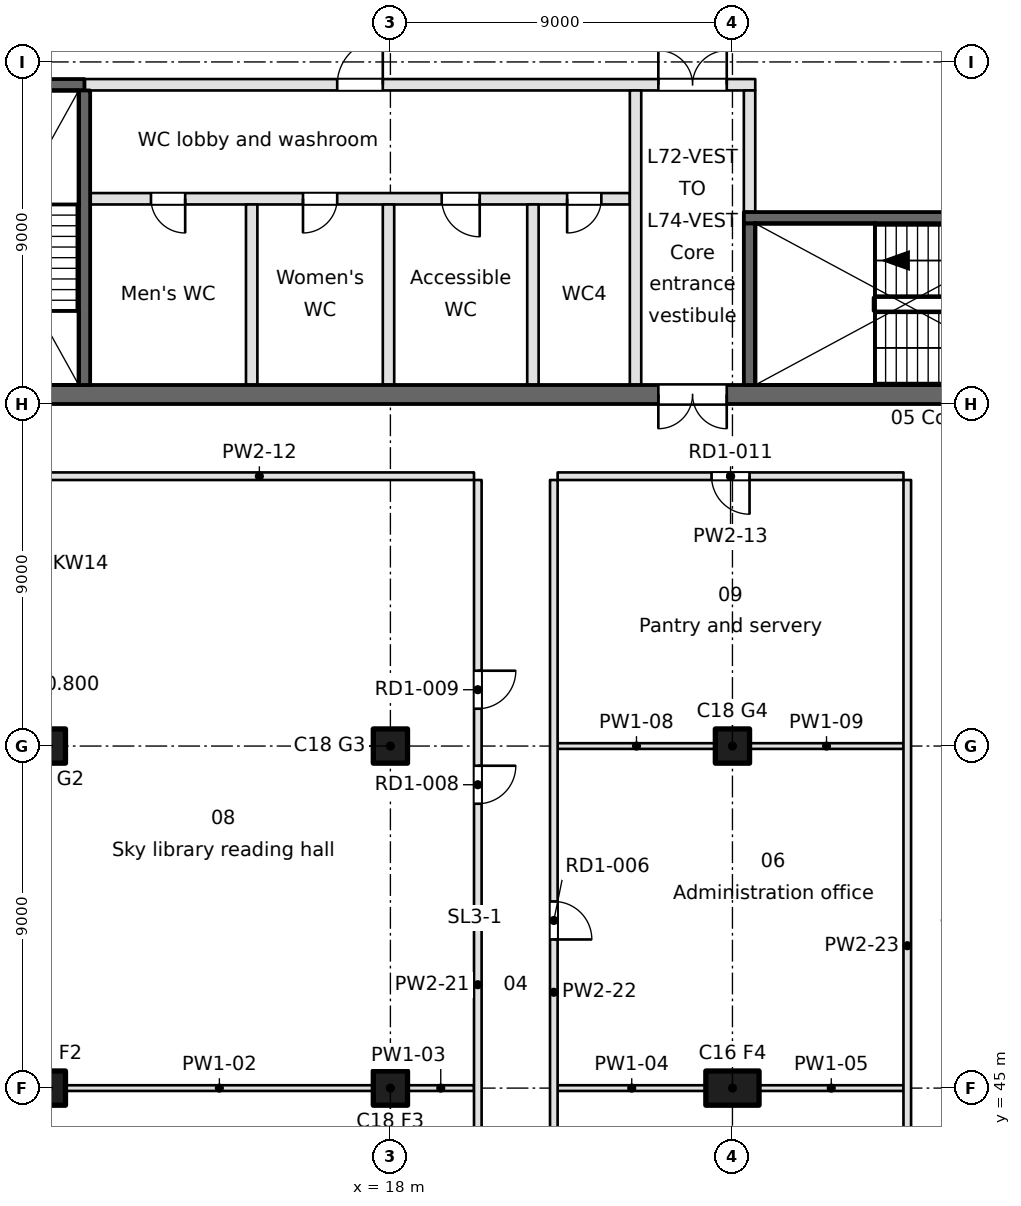
"""IFC4 building model, lengths in metres.
Left out: names, types, materials, properties, quantities, classifications, styles, units other than length and angle.
Written with IfcOpenShell. Run it as: python <this file> out.ifc"""

import sys

from ifc_helpers import new_model, si_unit, direction, frame, frame_2d, origin, origin_2d, place, context, subcontext, project, spatial, rectangle, extrude, element, fill, save


model = new_model("IFC4")
c1 = context("Model", 3, precision=1e-05, world=origin(), true_north=direction((0.0, 1.0)))
c2 = subcontext(c1, "Body", "Model", "MODEL_VIEW")
j1 = project(units=[si_unit("LENGTHUNIT", "METRE"), si_unit("PLANEANGLEUNIT", "RADIAN")], contexts=[c1])
p1 = place(None, origin())
s1 = spatial("IfcSite", under=j1, at=p1, CompositionType="ELEMENT")
p2 = place(p1, origin())
s2 = spatial("IfcBuilding", under=s1, at=p2, CompositionType="ELEMENT")
p3 = place(p2, frame((0.0, 0.0, 280.8)))
s3 = spatial("IfcBuildingStorey", under=s2, at=p3, CompositionType="ELEMENT", Elevation=280.8)
for number, where, z_axis, x_axis in (
    (1, (9.0, 45.0, 0.0), (0.0, 0.0, 1.0), (1.0, 0.0, 0.0)),
    (2, (9.0, 54.0, 0.0), (0.0, 0.0, 1.0), (1.0, 0.0, 0.0)),
    (3, (18.0, 45.0, 0.0), (0.0, 0.0, 1.0), (1.0, 0.0, 0.0)),
    (4, (18.0, 54.0, 0.0), (0.0, 0.0, 1.0), (1.0, 0.0, 0.0)),
):
    element("IfcColumn", number, at=place(p3, frame(where, z_axis=z_axis, x_axis=x_axis)), inside=s3, PredefinedType="COLUMN", context=c2, shape_type="SweptSolid", body=[
        extrude(rectangle(XDim=0.9, YDim=0.9, at=origin_2d()), origin(), (0.0, 0.0, 1.0), 3.7),
    ])
p4 = place(p3, frame((27.0, 45.0, 0.0), z_axis=(0.0, 0.0, 1.0), x_axis=(1.0, 0.0, 0.0)))
e5 = element("IfcColumn", 5, at=p4, inside=s3, PredefinedType="COLUMN", context=c2, shape_type="SweptSolid", body=[
    extrude(rectangle(XDim=1.4, YDim=0.9, at=origin_2d()), origin(), (0.0, 0.0, 1.0), 3.7),
])
p5 = place(p3, frame((27.0, 54.0, 0.0), z_axis=(0.0, 0.0, 1.0), x_axis=(1.0, 0.0, 0.0)))
e6 = element("IfcColumn", 6, at=p5, inside=s3, PredefinedType="COLUMN", context=c2, shape_type="SweptSolid", body=[
    extrude(rectangle(XDim=0.9, YDim=0.9, at=origin_2d()), origin(), (0.0, 0.0, 1.0), 3.7),
])
p6 = place(p3, frame((0.9, 63.25, -0.4), z_axis=(0.0, 0.0, 1.0), x_axis=(1.0, 0.0, 0.0)))
e7 = element("IfcWall", 7, at=p6, inside=s3, PredefinedType="SOLIDWALL", context=c2, shape_type="SweptSolid", body=[
    extrude(rectangle(XDim=35.1, YDim=0.5, at=frame_2d((17.55, 0.0))), origin(), (0.0, 0.0, 1.0), 3.7),
])
p7 = place(p6, frame((24.15, 0.0, 0.4)))
e8 = element("IfcOpeningElement", 8, at=p7, cuts=e7, PredefinedType="OPENING", context=c2, shape_type="SweptSolid", body=[
    extrude(rectangle(XDim=1.8, YDim=2.1, at=frame_2d((0.9, 1.05))), frame((0.0, 0.25, 0.0), z_axis=(0.0, -1.0, 0.0), x_axis=(1.0, 0.0, 0.0)), (0.0, 0.0, 1.0), 0.5),
])
p8 = place(p6, frame((1.55, 0.0, 0.4)))
e9 = element("IfcOpeningElement", 9, at=p8, cuts=e7, PredefinedType="OPENING", context=c2, shape_type="SweptSolid", body=[
    extrude(rectangle(XDim=1.2, YDim=2.1, at=frame_2d((0.6, 1.05))), frame((0.0, 0.25, 0.0), z_axis=(0.0, -1.0, 0.0), x_axis=(1.0, 0.0, 0.0)), (0.0, 0.0, 1.0), 0.5),
])
p9 = place(p6, frame((6.15, 0.0, 0.4)))
e10 = element("IfcOpeningElement", 10, at=p9, cuts=e7, PredefinedType="OPENING", context=c2, shape_type="SweptSolid", body=[
    extrude(rectangle(XDim=1.2, YDim=2.1, at=frame_2d((0.6, 1.05))), frame((0.0, 0.25, 0.0), z_axis=(0.0, -1.0, 0.0), x_axis=(1.0, 0.0, 0.0)), (0.0, 0.0, 1.0), 0.5),
])
p10 = place(p3, frame((27.3, 67.9, -0.4), z_axis=(0.0, 0.0, 1.0), x_axis=(1.0, 0.0, 0.0)))
e11 = element("IfcWall", 11, at=p10, inside=s3, PredefinedType="SOLIDWALL", context=c2, shape_type="SweptSolid", body=[
    extrude(rectangle(XDim=8.2, YDim=0.3, at=frame_2d((4.1, 0.0))), origin(), (0.0, 0.0, 1.0), 3.7),
])
p11 = place(p3, frame((10.1, 68.4, 0.0), z_axis=(0.0, 0.0, 1.0), x_axis=(1.0, 0.0, 0.0)))
e12 = element("IfcWall", 12, at=p11, inside=s3, PredefinedType="PARTITIONING", context=c2, shape_type="SweptSolid", body=[
    extrude(rectangle(XDim=14.2, YDim=0.3, at=frame_2d((7.1, 0.0))), origin(), (0.0, 0.0, 1.0), 3.3),
])
p12 = place(p11, frame((1.6, 0.0, 0.0)))
e13 = element("IfcOpeningElement", 13, at=p12, cuts=e12, PredefinedType="OPENING", context=c2, shape_type="SweptSolid", body=[
    extrude(rectangle(XDim=0.9, YDim=2.1, at=frame_2d((0.45, 1.05))), frame((0.0, 0.15, 0.0), z_axis=(0.0, -1.0, 0.0), x_axis=(1.0, 0.0, 0.0)), (0.0, 0.0, 1.0), 0.3),
])
p13 = place(p11, frame((5.6, 0.0, 0.0)))
e14 = element("IfcOpeningElement", 14, at=p13, cuts=e12, PredefinedType="OPENING", context=c2, shape_type="SweptSolid", body=[
    extrude(rectangle(XDim=0.9, YDim=2.1, at=frame_2d((0.45, 1.05))), frame((0.0, 0.15, 0.0), z_axis=(0.0, -1.0, 0.0), x_axis=(1.0, 0.0, 0.0)), (0.0, 0.0, 1.0), 0.3),
])
p14 = place(p11, frame((9.25, 0.0, 0.0)))
e15 = element("IfcOpeningElement", 15, at=p14, cuts=e12, PredefinedType="OPENING", context=c2, shape_type="SweptSolid", body=[
    extrude(rectangle(XDim=1.0, YDim=2.1, at=frame_2d((0.5, 1.05))), frame((0.0, 0.15, 0.0), z_axis=(0.0, -1.0, 0.0), x_axis=(1.0, 0.0, 0.0)), (0.0, 0.0, 1.0), 0.3),
])
p15 = place(p11, frame((12.55, 0.0, 0.0)))
e16 = element("IfcOpeningElement", 16, at=p15, cuts=e12, PredefinedType="OPENING", context=c2, shape_type="SweptSolid", body=[
    extrude(rectangle(XDim=0.9, YDim=2.1, at=frame_2d((0.45, 1.05))), frame((0.0, 0.15, 0.0), z_axis=(0.0, -1.0, 0.0), x_axis=(1.0, 0.0, 0.0)), (0.0, 0.0, 1.0), 0.3),
])
p16 = place(p3, frame((0.9, 71.4, -0.4), z_axis=(0.0, 0.0, 1.0), x_axis=(1.0, 0.0, 0.0)))
e17 = element("IfcWall", 17, at=p16, inside=s3, PredefinedType="SOLIDWALL", context=c2, shape_type="SweptSolid", body=[
    extrude(rectangle(XDim=9.05, YDim=0.3, at=frame_2d((4.525, 0.0))), origin(), (0.0, 0.0, 1.0), 3.7),
])
p17 = place(p3, frame((9.95, 71.4, 0.0), z_axis=(0.0, 0.0, 1.0), x_axis=(1.0, 0.0, 0.0)))
e18 = element("IfcWall", 18, at=p17, inside=s3, PredefinedType="PARTITIONING", context=c2, shape_type="SweptSolid", body=[
    extrude(rectangle(XDim=17.65, YDim=0.3, at=frame_2d((8.825, 0.0))), origin(), (0.0, 0.0, 1.0), 3.3),
])
p18 = place(p17, frame((15.1, 0.0, 0.0)))
e19 = element("IfcOpeningElement", 19, at=p18, cuts=e18, PredefinedType="OPENING", context=c2, shape_type="SweptSolid", body=[
    extrude(rectangle(XDim=1.8, YDim=2.1, at=frame_2d((0.9, 1.05))), frame((0.0, 0.15, 0.0), z_axis=(0.0, -1.0, 0.0), x_axis=(1.0, 0.0, 0.0)), (0.0, 0.0, 1.0), 0.3),
])
p19 = place(p17, frame((6.65, 0.0, 0.0)))
e20 = element("IfcOpeningElement", 20, at=p19, cuts=e18, PredefinedType="OPENING", context=c2, shape_type="SweptSolid", body=[
    extrude(rectangle(XDim=1.2, YDim=2.1, at=frame_2d((0.6, 1.05))), frame((0.0, 0.15, 0.0), z_axis=(0.0, -1.0, 0.0), x_axis=(1.0, 0.0, 0.0)), (0.0, 0.0, 1.0), 0.3),
])
p20 = place(p3, frame((9.95, 63.5, -0.4), z_axis=(0.0, 0.0, 1.0), x_axis=(0.0, 1.0, 0.0)))
e21 = element("IfcWall", 21, at=p20, inside=s3, PredefinedType="SOLIDWALL", context=c2, shape_type="SweptSolid", body=[
    extrude(rectangle(XDim=7.75, YDim=0.3, at=frame_2d((3.875, 0.0))), origin(), (0.0, 0.0, 1.0), 3.7),
])
for number, where, z_axis, x_axis in (
    (22, (14.35, 63.5, 0.0), (0.0, 0.0, 1.0), (0.0, 1.0, 0.0)),
    (23, (17.95, 63.5, 0.0), (0.0, 0.0, 1.0), (0.0, 1.0, 0.0)),
    (24, (21.75, 63.5, 0.0), (0.0, 0.0, 1.0), (0.0, 1.0, 0.0)),
):
    element("IfcWall", number, at=place(p3, frame(where, z_axis=z_axis, x_axis=x_axis)), inside=s3, PredefinedType="PARTITIONING", context=c2, shape_type="SweptSolid", body=[
        extrude(rectangle(XDim=4.75, YDim=0.3, at=frame_2d((2.375, 0.0))), origin(), (0.0, 0.0, 1.0), 3.3),
    ])
p21 = place(p3, frame((24.45, 63.5, 0.0), z_axis=(0.0, 0.0, 1.0), x_axis=(0.0, 1.0, 0.0)))
e25 = element("IfcWall", 25, at=p21, inside=s3, PredefinedType="PARTITIONING", context=c2, shape_type="SweptSolid", body=[
    extrude(rectangle(XDim=7.75, YDim=0.3, at=frame_2d((3.875, 0.0))), origin(), (0.0, 0.0, 1.0), 3.3),
])
p22 = place(p3, frame((27.45, 63.5, -0.4), z_axis=(0.0, 0.0, 1.0), x_axis=(0.0, 1.0, 0.0)))
e26 = element("IfcWall", 26, at=p22, inside=s3, PredefinedType="SOLIDWALL", context=c2, shape_type="SweptSolid", body=[
    extrude(rectangle(XDim=4.25, YDim=0.3, at=frame_2d((2.125, 0.0))), origin(), (0.0, 0.0, 1.0), 3.7),
])
p23 = place(p3, frame((27.45, 68.05, 0.0), z_axis=(0.0, 0.0, 1.0), x_axis=(0.0, 1.0, 0.0)))
e27 = element("IfcWall", 27, at=p23, inside=s3, PredefinedType="PARTITIONING", context=c2, shape_type="SweptSolid", body=[
    extrude(rectangle(XDim=3.2, YDim=0.3, at=frame_2d((1.6, 0.0))), origin(), (0.0, 0.0, 1.0), 3.3),
])
p24 = place(p3, frame((9.45, 45.0, 0.0), z_axis=(0.0, 0.0, 1.0), x_axis=(1.0, 0.0, 0.0)))
e28 = element("IfcWall", 28, at=p24, inside=s3, PredefinedType="PARTITIONING", context=c2, shape_type="SweptSolid", body=[
    extrude(rectangle(XDim=8.1, YDim=0.15, at=frame_2d((4.05, 0.0))), origin(), (0.0, 0.0, 1.0), 3.3),
])
p25 = place(p3, frame((18.45, 45.0, 0.0), z_axis=(0.0, 0.0, 1.0), x_axis=(1.0, 0.0, 0.0)))
e29 = element("IfcWall", 29, at=p25, inside=s3, PredefinedType="PARTITIONING", context=c2, shape_type="SweptSolid", body=[
    extrude(rectangle(XDim=1.75, YDim=0.15, at=frame_2d((0.875, 0.0))), origin(), (0.0, 0.0, 1.0), 3.3),
])
p26 = place(p3, frame((22.4, 45.0, 0.0), z_axis=(0.0, 0.0, 1.0), x_axis=(1.0, 0.0, 0.0)))
e30 = element("IfcWall", 30, at=p26, inside=s3, PredefinedType="PARTITIONING", context=c2, shape_type="SweptSolid", body=[
    extrude(rectangle(XDim=3.9, YDim=0.15, at=frame_2d((1.95, 0.0))), origin(), (0.0, 0.0, 1.0), 3.3),
])
p27 = place(p3, frame((27.7, 45.0, 0.0), z_axis=(0.0, 0.0, 1.0), x_axis=(1.0, 0.0, 0.0)))
e31 = element("IfcWall", 31, at=p27, inside=s3, PredefinedType="PARTITIONING", context=c2, shape_type="SweptSolid", body=[
    extrude(rectangle(XDim=3.8, YDim=0.15, at=frame_2d((1.9, 0.0))), origin(), (0.0, 0.0, 1.0), 3.3),
])
p28 = place(p3, frame((22.4, 54.0, 0.0), z_axis=(0.0, 0.0, 1.0), x_axis=(1.0, 0.0, 0.0)))
e32 = element("IfcWall", 32, at=p28, inside=s3, PredefinedType="PARTITIONING", context=c2, shape_type="SweptSolid", body=[
    extrude(rectangle(XDim=4.15, YDim=0.15, at=frame_2d((2.075, 0.0))), origin(), (0.0, 0.0, 1.0), 3.3),
])
p29 = place(p3, frame((27.45, 54.0, 0.0), z_axis=(0.0, 0.0, 1.0), x_axis=(1.0, 0.0, 0.0)))
e33 = element("IfcWall", 33, at=p29, inside=s3, PredefinedType="PARTITIONING", context=c2, shape_type="SweptSolid", body=[
    extrude(rectangle(XDim=4.05, YDim=0.15, at=frame_2d((2.025, 0.0))), origin(), (0.0, 0.0, 1.0), 3.3),
])
p30 = place(p3, frame((20.2, 61.1, 0.0), z_axis=(0.0, 0.0, 1.0), x_axis=(-1.0, 0.0, 0.0)))
e34 = element("IfcWall", 34, at=p30, inside=s3, PredefinedType="PARTITIONING", context=c2, shape_type="SweptSolid", body=[
    extrude(rectangle(XDim=11.296, YDim=0.2, at=frame_2d((5.648, 0.0))), origin(), (0.0, 0.0, 1.0), 3.3),
])
p31 = place(p3, frame((31.5, 61.1, 0.0), z_axis=(0.0, 0.0, 1.0), x_axis=(-1.0, 0.0, 0.0)))
e35 = element("IfcWall", 35, at=p31, inside=s3, PredefinedType="PARTITIONING", context=c2, shape_type="SweptSolid", body=[
    extrude(rectangle(XDim=9.1, YDim=0.2, at=frame_2d((4.55, 0.0))), origin(), (0.0, 0.0, 1.0), 3.3),
])
p32 = place(p31, frame((4.05, 0.0, 0.0)))
e36 = element("IfcOpeningElement", 36, at=p32, cuts=e35, PredefinedType="OPENING", context=c2, shape_type="SweptSolid", body=[
    extrude(rectangle(XDim=1.0, YDim=2.1, at=frame_2d((0.5, 1.05))), frame((0.0, 0.1, 0.0), z_axis=(0.0, -1.0, 0.0), x_axis=(1.0, 0.0, 0.0)), (0.0, 0.0, 1.0), 0.2),
])
p33 = place(p3, frame((20.3, 34.441, 0.0), z_axis=(0.0, 0.0, 1.0), x_axis=(0.0, 1.0, 0.0)))
e37 = element("IfcWall", 37, at=p33, inside=s3, PredefinedType="PARTITIONING", context=c2, shape_type="SweptSolid", body=[
    extrude(rectangle(XDim=26.559, YDim=0.2, at=frame_2d((13.28, 0.0))), origin(), (0.0, 0.0, 1.0), 3.3),
])
p34 = place(p33, frame((4.762, 0.0, 0.0)))
e38 = element("IfcOpeningElement", 38, at=p34, cuts=e37, PredefinedType="OPENING", context=c2, shape_type="SweptSolid", body=[
    extrude(rectangle(XDim=1.0, YDim=2.1, at=frame_2d((0.5, 1.05))), frame((0.0, 0.1, 0.0), z_axis=(0.0, -1.0, 0.0), x_axis=(1.0, 0.0, 0.0)), (0.0, 0.0, 1.0), 0.2),
])
p35 = place(p33, frame((7.262, 0.0, 0.0)))
e39 = element("IfcOpeningElement", 39, at=p35, cuts=e37, PredefinedType="OPENING", context=c2, shape_type="SweptSolid", body=[
    extrude(rectangle(XDim=1.0, YDim=2.1, at=frame_2d((0.5, 1.05))), frame((0.0, 0.1, 0.0), z_axis=(0.0, -1.0, 0.0), x_axis=(1.0, 0.0, 0.0)), (0.0, 0.0, 1.0), 0.2),
])
p36 = place(p33, frame((18.042, 0.0, 0.0)))
e40 = element("IfcOpeningElement", 40, at=p36, cuts=e37, PredefinedType="OPENING", context=c2, shape_type="SweptSolid", body=[
    extrude(rectangle(XDim=1.0, YDim=2.1, at=frame_2d((0.5, 1.05))), frame((0.0, 0.1, 0.0), z_axis=(0.0, -1.0, 0.0), x_axis=(1.0, 0.0, 0.0)), (0.0, 0.0, 1.0), 0.2),
])
p37 = place(p33, frame((20.542, 0.0, 0.0)))
e41 = element("IfcOpeningElement", 41, at=p37, cuts=e37, PredefinedType="OPENING", context=c2, shape_type="SweptSolid", body=[
    extrude(rectangle(XDim=1.0, YDim=2.1, at=frame_2d((0.5, 1.05))), frame((0.0, 0.1, 0.0), z_axis=(0.0, -1.0, 0.0), x_axis=(1.0, 0.0, 0.0)), (0.0, 0.0, 1.0), 0.2),
])
p38 = place(p3, frame((22.3, 61.0, 0.0), z_axis=(0.0, 0.0, 1.0), x_axis=(0.0, -1.0, 0.0)))
e42 = element("IfcWall", 42, at=p38, inside=s3, PredefinedType="PARTITIONING", context=c2, shape_type="SweptSolid", body=[
    extrude(rectangle(XDim=26.957, YDim=0.2, at=frame_2d((13.479, 0.0))), origin(), (0.0, 0.0, 1.0), 3.3),
])
p39 = place(p38, frame((20.915, 0.0, 0.0)))
e43 = element("IfcOpeningElement", 43, at=p39, cuts=e42, PredefinedType="OPENING", context=c2, shape_type="SweptSolid", body=[
    extrude(rectangle(XDim=1.0, YDim=2.1, at=frame_2d((0.5, 1.05))), frame((0.0, 0.1, 0.0), z_axis=(0.0, -1.0, 0.0), x_axis=(1.0, 0.0, 0.0)), (0.0, 0.0, 1.0), 0.2),
])
p40 = place(p38, frame((18.415, 0.0, 0.0)))
e44 = element("IfcOpeningElement", 44, at=p40, cuts=e42, PredefinedType="OPENING", context=c2, shape_type="SweptSolid", body=[
    extrude(rectangle(XDim=1.0, YDim=2.1, at=frame_2d((0.5, 1.05))), frame((0.0, 0.1, 0.0), z_axis=(0.0, -1.0, 0.0), x_axis=(1.0, 0.0, 0.0)), (0.0, 0.0, 1.0), 0.2),
])
p41 = place(p38, frame((11.089, 0.0, 0.0)))
e45 = element("IfcOpeningElement", 45, at=p41, cuts=e42, PredefinedType="OPENING", context=c2, shape_type="SweptSolid", body=[
    extrude(rectangle(XDim=1.0, YDim=2.1, at=frame_2d((0.5, 1.05))), frame((0.0, 0.1, 0.0), z_axis=(0.0, -1.0, 0.0), x_axis=(1.0, 0.0, 0.0)), (0.0, 0.0, 1.0), 0.2),
])
p42 = place(p3, frame((31.6, 36.492, 0.0), z_axis=(0.0, 0.0, 1.0), x_axis=(0.0, 1.0, 0.0)))
e46 = element("IfcWall", 46, at=p42, inside=s3, PredefinedType="PARTITIONING", context=c2, shape_type="SweptSolid", body=[
    extrude(rectangle(XDim=24.508, YDim=0.2, at=frame_2d((12.254, 0.0))), origin(), (0.0, 0.0, 1.0), 3.3),
])
p43 = place(p7, frame((1.8, 0.0, 0.0), z_axis=(0.0, 0.0, 1.0), x_axis=(-1.0, 0.0, 0.0)))
e47 = element("IfcDoor", 47, at=p43, inside=s3, OperationType="DOUBLE_DOOR_SINGLE_SWING", PredefinedType="DOOR", context=c2, shape_type="SweptSolid", body=[
    extrude(rectangle(XDim=1.8, YDim=2.1, at=frame_2d((0.9, 1.05))), frame((0.0, 0.025, 0.0), z_axis=(0.0, -1.0, 0.0), x_axis=(1.0, 0.0, 0.0)), (0.0, 0.0, 1.0), 0.05),
])
fill(e8, e47)
p44 = place(p18, origin())
e48 = element("IfcDoor", 48, at=p44, inside=s3, OperationType="DOUBLE_DOOR_SINGLE_SWING", PredefinedType="DOOR", context=c2, shape_type="SweptSolid", body=[
    extrude(rectangle(XDim=1.8, YDim=2.1, at=frame_2d((0.9, 1.05))), frame((0.0, 0.025, 0.0), z_axis=(0.0, -1.0, 0.0), x_axis=(1.0, 0.0, 0.0)), (0.0, 0.0, 1.0), 0.05),
])
fill(e19, e48)
p45 = place(p12, frame((0.9, 0.0, 0.0), z_axis=(0.0, 0.0, 1.0), x_axis=(-1.0, 0.0, 0.0)))
e49 = element("IfcDoor", 49, at=p45, inside=s3, OperationType="SINGLE_SWING_LEFT", PredefinedType="DOOR", context=c2, shape_type="SweptSolid", body=[
    extrude(rectangle(XDim=0.9, YDim=2.1, at=frame_2d((0.45, 1.05))), frame((0.0, 0.025, 0.0), z_axis=(0.0, -1.0, 0.0), x_axis=(1.0, 0.0, 0.0)), (0.0, 0.0, 1.0), 0.05),
])
fill(e13, e49)
p46 = place(p13, frame((0.9, 0.0, 0.0), z_axis=(0.0, 0.0, 1.0), x_axis=(-1.0, 0.0, 0.0)))
e50 = element("IfcDoor", 50, at=p46, inside=s3, OperationType="SINGLE_SWING_RIGHT", PredefinedType="DOOR", context=c2, shape_type="SweptSolid", body=[
    extrude(rectangle(XDim=0.9, YDim=2.1, at=frame_2d((0.45, 1.05))), frame((0.0, 0.025, 0.0), z_axis=(0.0, -1.0, 0.0), x_axis=(1.0, 0.0, 0.0)), (0.0, 0.0, 1.0), 0.05),
])
fill(e14, e50)
p47 = place(p14, frame((1.0, 0.0, 0.0), z_axis=(0.0, 0.0, 1.0), x_axis=(-1.0, 0.0, 0.0)))
e51 = element("IfcDoor", 51, at=p47, inside=s3, OperationType="SINGLE_SWING_LEFT", PredefinedType="DOOR", context=c2, shape_type="SweptSolid", body=[
    extrude(rectangle(XDim=1.0, YDim=2.1, at=frame_2d((0.5, 1.05))), frame((0.0, 0.025, 0.0), z_axis=(0.0, -1.0, 0.0), x_axis=(1.0, 0.0, 0.0)), (0.0, 0.0, 1.0), 0.05),
])
fill(e15, e51)
p48 = place(p15, frame((0.9, 0.0, 0.0), z_axis=(0.0, 0.0, 1.0), x_axis=(-1.0, 0.0, 0.0)))
e52 = element("IfcDoor", 52, at=p48, inside=s3, OperationType="SINGLE_SWING_RIGHT", PredefinedType="DOOR", context=c2, shape_type="SweptSolid", body=[
    extrude(rectangle(XDim=0.9, YDim=2.1, at=frame_2d((0.45, 1.05))), frame((0.0, 0.025, 0.0), z_axis=(0.0, -1.0, 0.0), x_axis=(1.0, 0.0, 0.0)), (0.0, 0.0, 1.0), 0.05),
])
fill(e16, e52)
p49 = place(p19, origin())
e53 = element("IfcDoor", 53, at=p49, inside=s3, OperationType="SINGLE_SWING_RIGHT", PredefinedType="DOOR", context=c2, shape_type="SweptSolid", body=[
    extrude(rectangle(XDim=1.2, YDim=2.1, at=frame_2d((0.6, 1.05))), frame((0.0, 0.025, 0.0), z_axis=(0.0, -1.0, 0.0), x_axis=(1.0, 0.0, 0.0)), (0.0, 0.0, 1.0), 0.05),
])
fill(e20, e53)
p50 = place(p41, origin())
e54 = element("IfcDoor", 54, at=p50, inside=s3, OperationType="SINGLE_SWING_RIGHT", PredefinedType="DOOR", context=c2, shape_type="SweptSolid", body=[
    extrude(rectangle(XDim=1.0, YDim=2.1, at=frame_2d((0.5, 1.05))), frame((0.0, 0.025, 0.0), z_axis=(0.0, -1.0, 0.0), x_axis=(1.0, 0.0, 0.0)), (0.0, 0.0, 1.0), 0.05),
])
fill(e45, e54)
p51 = place(p36, frame((1.0, 0.0, 0.0), z_axis=(0.0, 0.0, 1.0), x_axis=(-1.0, 0.0, 0.0)))
e55 = element("IfcDoor", 55, at=p51, inside=s3, OperationType="SINGLE_SWING_LEFT", PredefinedType="DOOR", context=c2, shape_type="SweptSolid", body=[
    extrude(rectangle(XDim=1.0, YDim=2.1, at=frame_2d((0.5, 1.05))), frame((0.0, 0.025, 0.0), z_axis=(0.0, -1.0, 0.0), x_axis=(1.0, 0.0, 0.0)), (0.0, 0.0, 1.0), 0.05),
])
fill(e40, e55)
p52 = place(p37, frame((1.0, 0.0, 0.0), z_axis=(0.0, 0.0, 1.0), x_axis=(-1.0, 0.0, 0.0)))
e56 = element("IfcDoor", 56, at=p52, inside=s3, OperationType="SINGLE_SWING_LEFT", PredefinedType="DOOR", context=c2, shape_type="SweptSolid", body=[
    extrude(rectangle(XDim=1.0, YDim=2.1, at=frame_2d((0.5, 1.05))), frame((0.0, 0.025, 0.0), z_axis=(0.0, -1.0, 0.0), x_axis=(1.0, 0.0, 0.0)), (0.0, 0.0, 1.0), 0.05),
])
fill(e41, e56)
p53 = place(p32, origin())
e57 = element("IfcDoor", 57, at=p53, inside=s3, OperationType="SINGLE_SWING_LEFT", PredefinedType="DOOR", context=c2, shape_type="SweptSolid", body=[
    extrude(rectangle(XDim=1.0, YDim=2.1, at=frame_2d((0.5, 1.05))), frame((0.0, 0.025, 0.0), z_axis=(0.0, -1.0, 0.0), x_axis=(1.0, 0.0, 0.0)), (0.0, 0.0, 1.0), 0.05),
])
fill(e36, e57)
save(model, sys.argv[1])
